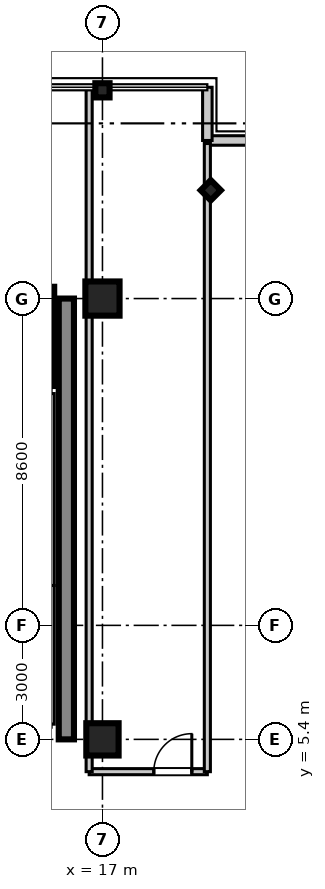
"""IFC4 building model, lengths in metres.
Left out: names, types, materials, properties, quantities, classifications, styles, units other than length and angle.
Written with IfcOpenShell. Run it as: python <this file> out.ifc"""

import sys

from ifc_helpers import new_model, si_unit, direction, frame, frame_2d, origin, origin_2d, place, context, subcontext, project, spatial, rectangle, i_section, extrude, source, transform, mapped, element, fill, save


model = new_model("IFC4")
c1 = context("Model", 3, precision=1e-05, world=origin(), true_north=direction((0.0, 1.0)))
c2 = subcontext(c1, "Body", "Model", "MODEL_VIEW")
j1 = project(units=[si_unit("LENGTHUNIT", "METRE"), si_unit("PLANEANGLEUNIT", "RADIAN")], contexts=[c1])
p1 = place(None, origin())
s1 = spatial("IfcSite", under=j1, at=p1, CompositionType="ELEMENT")
p2 = place(p1, origin())
s2 = spatial("IfcBuilding", under=s1, at=p2, CompositionType="ELEMENT")
p3 = place(p2, frame((0.0, 0.0, 304.2)))
s3 = spatial("IfcBuildingStorey", under=s2, at=p3, CompositionType="ELEMENT", Elevation=304.2)
m1 = source(origin(), c2, "Body", "SweptSolid", [
    extrude(rectangle(XDim=0.85, YDim=0.85, at=origin_2d()), origin(), (0.0, 0.0, 1.0), 3.805),
])
p4 = place(p3, frame((17.0, 5.4, 0.0), z_axis=(0.0, 0.0, 1.0), x_axis=(1.0, 0.0, 0.0)))
e1 = element("IfcColumn", 1, at=p4, inside=s3, PredefinedType="PILASTER", context=c2, shape_type="MappedRepresentation", body=[
    mapped(m1, transform((0.0, 0.0, 0.0), scale=1.0)),
])
m2 = source(origin(), c2, "Body", "SweptSolid", [
    extrude(rectangle(XDim=0.9, YDim=0.9, at=origin_2d()), origin(), (0.0, 0.0, 1.0), 3.805),
])
p5 = place(p3, frame((17.0, 17.0, 0.0), z_axis=(0.0, 0.0, 1.0), x_axis=(1.0, 0.0, 0.0)))
e2 = element("IfcColumn", 2, at=p5, inside=s3, PredefinedType="COLUMN", context=c2, shape_type="MappedRepresentation", body=[
    mapped(m2, transform((0.0, 0.0, 0.0), scale=1.0)),
])
m3 = source(origin(), c2, "Body", "SweptSolid", [
    extrude(i_section(OverallWidth=0.374, OverallDepth=0.374, WebThickness=0.014, FlangeThickness=0.023, at=origin_2d()), origin(), (0.0, 0.0, 1.0), 3.805),
])
for number, where, z_axis, x_axis in (
    (3, (17.0, 22.48, 0.0), (0.0, 0.0, 1.0), (0.0, 1.0, 0.0)),
    (4, (19.85, 19.85, 0.0), (0.0, 0.0, 1.0), (0.707, 0.707, 0.0)),
):
    element("IfcColumn", number, at=place(p3, frame(where, z_axis=z_axis, x_axis=x_axis)), inside=s3, PredefinedType="COLUMN", context=c2, shape_type="MappedRepresentation", body=[
        mapped(m3, transform((0.0, 0.0, 0.0), scale=1.0)),
    ])
m4 = source(origin(), c2, "Body", "SweptSolid", [
    extrude(rectangle(XDim=11.6, YDim=0.4, at=frame_2d((5.8, 0.0))), origin(), (0.0, 0.0, 1.0), 3.55),
])
p6 = place(p3, frame((16.05, 5.4, 0.0), z_axis=(0.0, 0.0, 1.0), x_axis=(0.0, 1.0, 0.0)))
e5 = element("IfcWall", 5, at=p6, inside=s3, PredefinedType="SHEAR", context=c2, shape_type="MappedRepresentation", body=[
    mapped(m4, transform((0.0, 0.0, 0.0), scale=1.0)),
])
m5 = source(origin(), c2, "Body", "SweptSolid", [
    extrude(rectangle(XDim=2.61, YDim=0.22, at=frame_2d((1.305, 0.0))), origin(), (0.0, 0.0, 1.0), 3.55),
])
p7 = place(p3, frame((15.62, 14.7, 0.0), z_axis=(0.0, 0.0, 1.0), x_axis=(0.0, 1.0, 0.0)))
e6 = element("IfcWall", 6, at=p7, inside=s3, PredefinedType="SHEAR", context=c2, shape_type="MappedRepresentation", body=[
    mapped(m5, transform((0.0, 0.0, 0.0), scale=1.0)),
])
m6 = source(origin(), c2, "Body", "SweptSolid", [
    extrude(rectangle(XDim=1.4, YDim=0.25, at=frame_2d((0.7, 0.0))), origin(), (0.0, 0.0, 1.0), 3.55),
])
p8 = place(p3, frame((19.76, 21.16, 0.0), z_axis=(0.0, 0.0, 1.0), x_axis=(1.0, 0.0, 0.0)))
e7 = element("IfcWall", 7, at=p8, inside=s3, PredefinedType="STANDARD", context=c2, shape_type="MappedRepresentation", body=[
    mapped(m6, transform((0.0, 0.0, 0.0), scale=1.0)),
])
m7 = source(origin(), c2, "Body", "SweptSolid", [
    extrude(rectangle(XDim=1.4, YDim=0.25, at=frame_2d((0.7, 0.0))), origin(), (0.0, 0.0, 1.0), 3.55),
])
p9 = place(p3, frame((19.76, 21.16, 0.0), z_axis=(0.0, 0.0, 1.0), x_axis=(0.0, 1.0, 0.0)))
e8 = element("IfcWall", 8, at=p9, inside=s3, PredefinedType="STANDARD", context=c2, shape_type="MappedRepresentation", body=[
    mapped(m7, transform((0.0, 0.0, 0.0), scale=1.0)),
])
m8 = source(origin(), c2, "Body", "SweptSolid", [
    extrude(rectangle(XDim=3.65, YDim=0.16, at=frame_2d((1.825, 0.0))), origin(), (0.0, 0.0, 1.0), 2.89),
])
p10 = place(p3, frame((15.65, 5.8, 0.0), z_axis=(0.0, 0.0, 1.0), x_axis=(0.0, 1.0, 0.0)))
e9 = element("IfcWall", 9, at=p10, inside=s3, PredefinedType="PARTITIONING", context=c2, shape_type="MappedRepresentation", body=[
    mapped(m8, transform((0.0, 0.0, 0.0), scale=1.0)),
])
m9 = source(origin(), c2, "Body", "SweptSolid", [
    extrude(rectangle(XDim=5.05, YDim=0.16, at=frame_2d((2.525, 0.0))), origin(), (0.0, 0.0, 1.0), 2.89),
])
p11 = place(p3, frame((15.65, 9.45, 0.0), z_axis=(0.0, 0.0, 1.0), x_axis=(0.0, 1.0, 0.0)))
e10 = element("IfcWall", 10, at=p11, inside=s3, PredefinedType="PARTITIONING", context=c2, shape_type="MappedRepresentation", body=[
    mapped(m9, transform((0.0, 0.0, 0.0), scale=1.0)),
])
m10 = source(origin(), c2, "Body", "SweptSolid", [
    extrude(rectangle(XDim=3.11, YDim=0.16, at=frame_2d((1.555, 0.0))), origin(), (0.0, 0.0, 1.0), 2.89),
])
p12 = place(p3, frame((16.65, 4.55, 0.0), z_axis=(0.0, 0.0, 1.0), x_axis=(1.0, 0.0, 0.0)))
e11 = element("IfcWall", 11, at=p12, inside=s3, PredefinedType="PARTITIONING", context=c2, shape_type="MappedRepresentation", body=[
    mapped(m10, transform((0.0, 0.0, 0.0), scale=1.0)),
])
p13 = place(p12, frame((1.701, 0.0, 0.0)))
e12 = element("IfcOpeningElement", 12, at=p13, cuts=e11, PredefinedType="OPENING", context=c2, shape_type="SweptSolid", body=[
    extrude(rectangle(XDim=1.0, YDim=2.1, at=frame_2d((0.5, 1.05))), frame((0.0, 0.09, 0.0), z_axis=(0.0, -1.0, 0.0), x_axis=(1.0, 0.0, 0.0)), (0.0, 0.0, 1.0), 0.18),
])
m11 = source(origin(), c2, "Body", "SweptSolid", [
    extrude(rectangle(XDim=17.95, YDim=0.16, at=frame_2d((8.975, 0.0))), origin(), (0.0, 0.0, 1.0), 2.89),
])
p14 = place(p3, frame((16.65, 4.55, 0.0), z_axis=(0.0, 0.0, 1.0), x_axis=(0.0, 1.0, 0.0)))
e13 = element("IfcWall", 13, at=p14, inside=s3, PredefinedType="PARTITIONING", context=c2, shape_type="MappedRepresentation", body=[
    mapped(m11, transform((0.0, 0.0, 0.0), scale=1.0)),
])
m12 = source(origin(), c2, "Body", "SweptSolid", [
    extrude(rectangle(XDim=16.53, YDim=0.16, at=frame_2d((8.265, 0.0))), origin(), (0.0, 0.0, 1.0), 2.89),
])
p15 = place(p3, frame((19.76, 4.55, 0.0), z_axis=(0.0, 0.0, 1.0), x_axis=(0.0, 1.0, 0.0)))
e14 = element("IfcWall", 14, at=p15, inside=s3, PredefinedType="PARTITIONING", context=c2, shape_type="MappedRepresentation", body=[
    mapped(m12, transform((0.0, 0.0, 0.0), scale=1.0)),
])
m13 = source(origin(), c2, "Body", "SweptSolid", [
    extrude(rectangle(XDim=1.0, YDim=2.1, at=frame_2d((0.5, 1.05))), frame((0.0, 0.025, 0.0), z_axis=(0.0, -1.0, 0.0), x_axis=(1.0, 0.0, 0.0)), (0.0, 0.0, 1.0), 0.05),
])
p16 = place(p13, origin())
e15 = element("IfcDoor", 15, at=p16, inside=s3, OperationType="SINGLE_SWING_RIGHT", PredefinedType="DOOR", context=c2, shape_type="MappedRepresentation", body=[
    mapped(m13, transform((0.0, 0.0, 0.0), scale=1.0)),
])
fill(e12, e15)
save(model, sys.argv[1])
